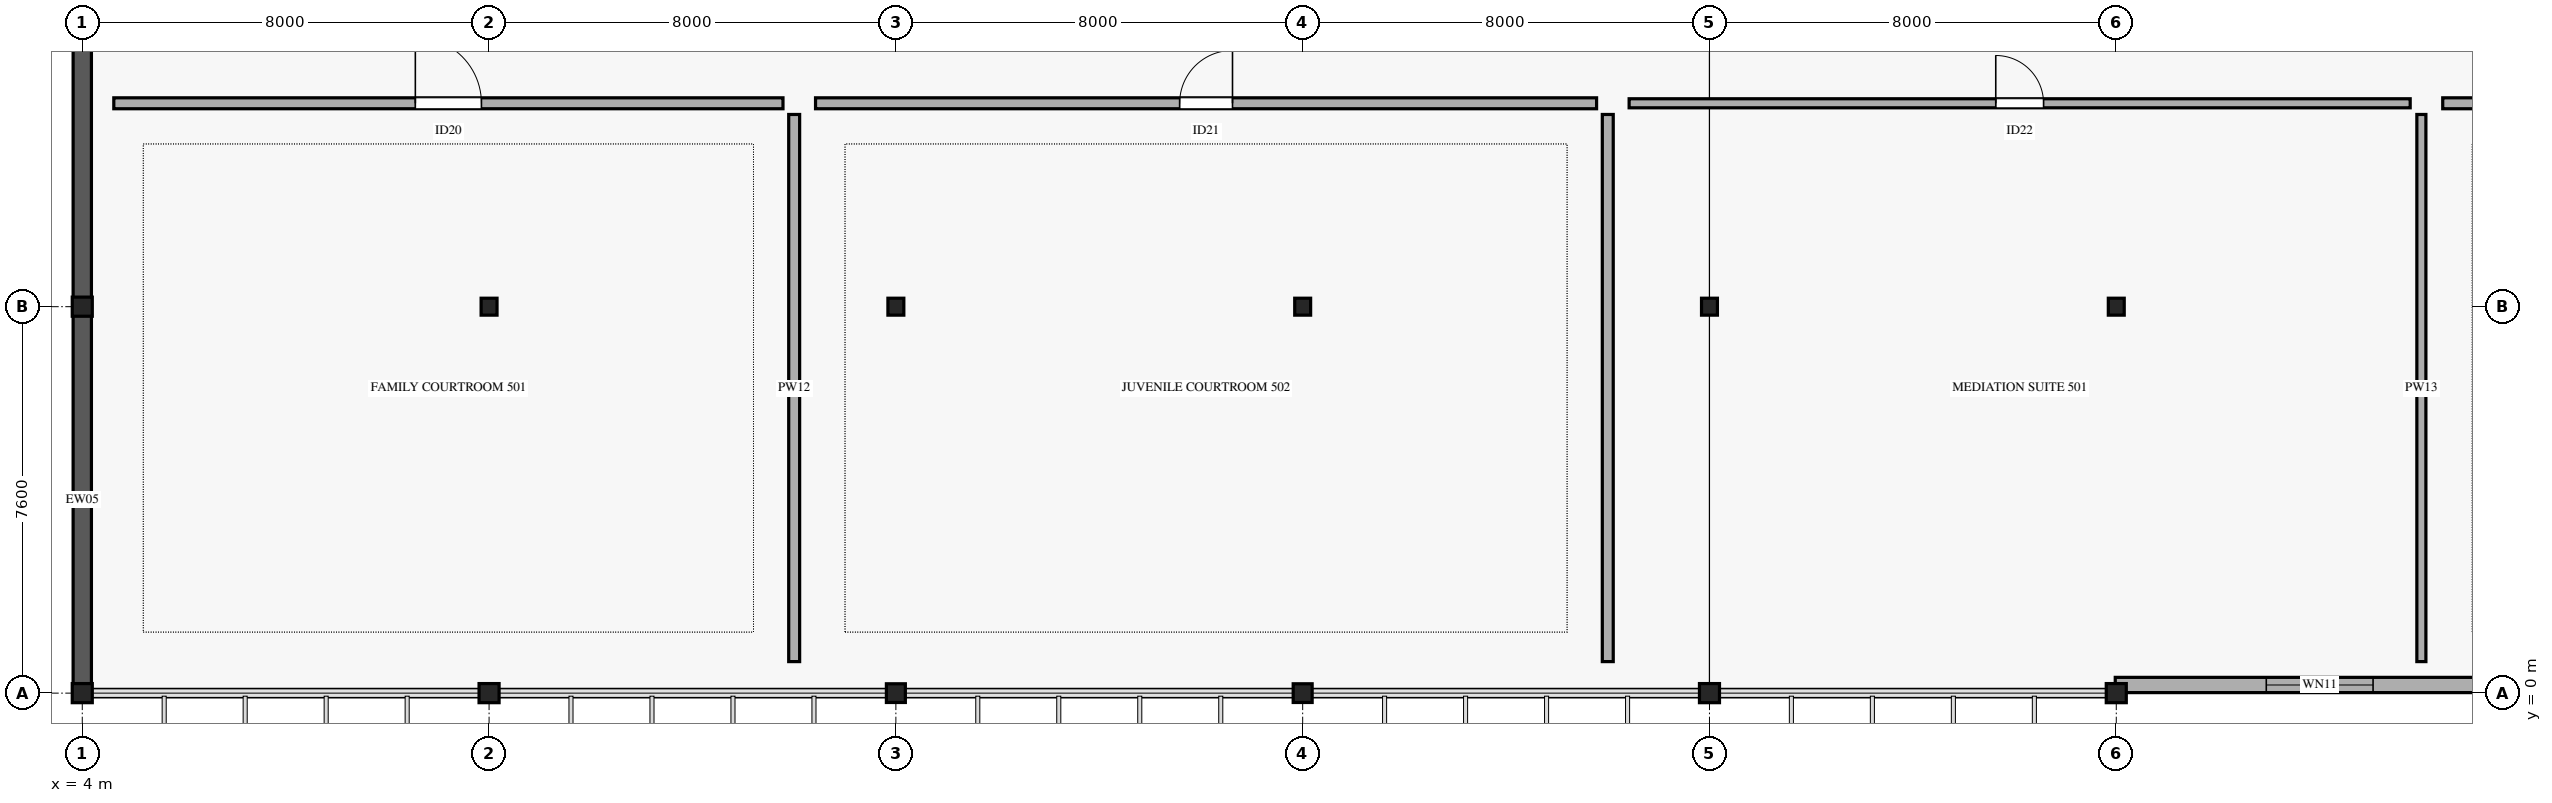
"""IFC4 building model, lengths in metres.
Left out: names, types, materials, properties, quantities, classifications, styles, units other than length and angle.
Written with IfcOpenShell. Run it as: python <this file> out.ifc"""

import sys

from ifc_helpers import new_model, si_unit, direction, frame, frame_2d, origin, origin_2d, place, context, subcontext, project, spatial, rectangle, i_section, extrude, element, fill, save


model = new_model("IFC4")
c1 = context("Model", 3, precision=1e-05, world=origin(), true_north=direction((0.0, 1.0)))
c2 = subcontext(c1, "Body", "Model", "MODEL_VIEW")
j1 = project(units=[si_unit("LENGTHUNIT", "METRE"), si_unit("PLANEANGLEUNIT", "RADIAN")], contexts=[c1])
p1 = place(None, origin())
s1 = spatial("IfcSite", under=j1, at=p1, CompositionType="ELEMENT")
p2 = place(p1, origin())
s2 = spatial("IfcBuilding", under=s1, at=p2, CompositionType="ELEMENT")
p3 = place(p2, frame((0.0, 0.0, 25.2)))
s3 = spatial("IfcBuildingStorey", under=s2, at=p3, CompositionType="ELEMENT", Elevation=25.2)
for number, where, z_axis, x_axis in (
    (1, (4.0, 0.0, 0.0), (0.0, 0.0, 1.0), (1.0, 0.0, 0.0)),
    (2, (4.0, 7.6, 0.0), (0.0, 0.0, 1.0), (1.0, 0.0, 0.0)),
    (3, (12.0, 0.0, 0.0), (0.0, 0.0, 1.0), (1.0, 0.0, 0.0)),
):
    element("IfcColumn", number, at=place(p3, frame(where, z_axis=z_axis, x_axis=x_axis)), inside=s3, PredefinedType="COLUMN", context=c2, shape_type="SweptSolid", body=[
        extrude(i_section(OverallWidth=0.394, OverallDepth=0.376, WebThickness=0.017, FlangeThickness=0.028, FilletRadius=0.015, at=origin_2d()), origin(), (0.0, 0.0, 1.0), 3.995),
    ])
p4 = place(p3, frame((12.0, 7.6, 0.0), z_axis=(0.0, 0.0, 1.0), x_axis=(1.0, 0.0, 0.0)))
e4 = element("IfcColumn", 4, at=p4, inside=s3, PredefinedType="COLUMN", context=c2, shape_type="SweptSolid", body=[
    extrude(i_section(OverallWidth=0.313, OverallDepth=0.333, WebThickness=0.018, FlangeThickness=0.028, FilletRadius=0.015, at=origin_2d()), origin(), (0.0, 0.0, 1.0), 3.995),
])
p5 = place(p3, frame((20.0, 0.0, 0.0), z_axis=(0.0, 0.0, 1.0), x_axis=(1.0, 0.0, 0.0)))
e5 = element("IfcColumn", 5, at=p5, inside=s3, PredefinedType="COLUMN", context=c2, shape_type="SweptSolid", body=[
    extrude(i_section(OverallWidth=0.373, OverallDepth=0.368, WebThickness=0.015, FlangeThickness=0.024, FilletRadius=0.015, at=origin_2d()), origin(), (0.0, 0.0, 1.0), 3.995),
])
p6 = place(p3, frame((20.0, 7.6, 0.0), z_axis=(0.0, 0.0, 1.0), x_axis=(1.0, 0.0, 0.0)))
e6 = element("IfcColumn", 6, at=p6, inside=s3, PredefinedType="COLUMN", context=c2, shape_type="SweptSolid", body=[
    extrude(i_section(OverallWidth=0.313, OverallDepth=0.333, WebThickness=0.018, FlangeThickness=0.028, FilletRadius=0.015, at=origin_2d()), origin(), (0.0, 0.0, 1.0), 3.995),
])
p7 = place(p3, frame((28.0, 0.0, 0.0), z_axis=(0.0, 0.0, 1.0), x_axis=(1.0, 0.0, 0.0)))
e7 = element("IfcColumn", 7, at=p7, inside=s3, PredefinedType="COLUMN", context=c2, shape_type="SweptSolid", body=[
    extrude(i_section(OverallWidth=0.373, OverallDepth=0.368, WebThickness=0.015, FlangeThickness=0.024, FilletRadius=0.015, at=origin_2d()), origin(), (0.0, 0.0, 1.0), 3.995),
])
p8 = place(p3, frame((28.0, 7.6, 0.0), z_axis=(0.0, 0.0, 1.0), x_axis=(1.0, 0.0, 0.0)))
e8 = element("IfcColumn", 8, at=p8, inside=s3, PredefinedType="COLUMN", context=c2, shape_type="SweptSolid", body=[
    extrude(i_section(OverallWidth=0.313, OverallDepth=0.333, WebThickness=0.018, FlangeThickness=0.028, FilletRadius=0.015, at=origin_2d()), origin(), (0.0, 0.0, 1.0), 3.995),
])
p9 = place(p3, frame((36.0, 0.0, 0.0), z_axis=(0.0, 0.0, 1.0), x_axis=(1.0, 0.0, 0.0)))
e9 = element("IfcColumn", 9, at=p9, inside=s3, PredefinedType="COLUMN", context=c2, shape_type="SweptSolid", body=[
    extrude(i_section(OverallWidth=0.394, OverallDepth=0.376, WebThickness=0.017, FlangeThickness=0.028, FilletRadius=0.015, at=origin_2d()), origin(), (0.0, 0.0, 1.0), 3.995),
])
p10 = place(p3, frame((36.0, 7.6, 0.0), z_axis=(0.0, 0.0, 1.0), x_axis=(1.0, 0.0, 0.0)))
e10 = element("IfcColumn", 10, at=p10, inside=s3, PredefinedType="COLUMN", context=c2, shape_type="SweptSolid", body=[
    extrude(i_section(OverallWidth=0.313, OverallDepth=0.333, WebThickness=0.018, FlangeThickness=0.028, FilletRadius=0.015, at=origin_2d()), origin(), (0.0, 0.0, 1.0), 3.995),
])
p11 = place(p3, frame((44.0, 0.0, 0.0), z_axis=(0.0, 0.0, 1.0), x_axis=(1.0, 0.0, 0.0)))
e11 = element("IfcColumn", 11, at=p11, inside=s3, PredefinedType="COLUMN", context=c2, shape_type="SweptSolid", body=[
    extrude(i_section(OverallWidth=0.394, OverallDepth=0.376, WebThickness=0.017, FlangeThickness=0.028, FilletRadius=0.015, at=origin_2d()), origin(), (0.0, 0.0, 1.0), 3.995),
])
p12 = place(p3, frame((44.0, 7.6, 0.0), z_axis=(0.0, 0.0, 1.0), x_axis=(1.0, 0.0, 0.0)))
e12 = element("IfcColumn", 12, at=p12, inside=s3, PredefinedType="COLUMN", context=c2, shape_type="SweptSolid", body=[
    extrude(i_section(OverallWidth=0.313, OverallDepth=0.333, WebThickness=0.018, FlangeThickness=0.028, FilletRadius=0.015, at=origin_2d()), origin(), (0.0, 0.0, 1.0), 3.995),
])
p13 = place(p3, frame((4.0, -0.02, 0.0), z_axis=(0.0, 0.0, 1.0), x_axis=(0.0, 1.0, 0.0)))
e13 = element("IfcWall", 13, at=p13, inside=s3, PredefinedType="STANDARD", context=c2, shape_type="SweptSolid", body=[
    extrude(rectangle(XDim=7.64, YDim=0.36, at=frame_2d((3.82, 0.0))), origin(), (0.0, 0.0, 1.0), 4.0),
])
p14 = place(p3, frame((4.0, 7.58, 0.0), z_axis=(0.0, 0.0, 1.0), x_axis=(0.0, 1.0, 0.0)))
e14 = element("IfcWall", 14, at=p14, inside=s3, PredefinedType="STANDARD", context=c2, shape_type="SweptSolid", body=[
    extrude(rectangle(XDim=7.64, YDim=0.36, at=frame_2d((3.82, 0.0))), origin(), (0.0, 0.0, 1.0), 4.0),
])
p15 = place(p3, frame((52.02, 0.16, 0.0), z_axis=(0.0, 0.0, 1.0), x_axis=(-1.0, 0.0, 0.0)))
e15 = element("IfcWall", 15, at=p15, inside=s3, PredefinedType="STANDARD", context=c2, shape_type="SweptSolid", body=[
    extrude(rectangle(XDim=8.04, YDim=0.3, at=frame_2d((4.02, 0.0))), origin(), (0.0, 0.0, 1.0), 3.06),
])
p16 = place(p15, frame((2.97, 0.0, 0.75)))
e16 = element("IfcOpeningElement", 16, at=p16, cuts=e15, PredefinedType="OPENING", context=c2, shape_type="SweptSolid", body=[
    extrude(rectangle(XDim=2.1, YDim=2.15, at=frame_2d((1.05, 1.075))), frame((0.0, 0.16, 0.0), z_axis=(0.0, -1.0, 0.0), x_axis=(1.0, 0.0, 0.0)), (0.0, 0.0, 1.0), 0.32),
])
p17 = place(p3, frame((4.62, 11.6, 0.0), z_axis=(0.0, 0.0, 1.0), x_axis=(1.0, 0.0, 0.0)))
e17 = element("IfcWall", 17, at=p17, inside=s3, PredefinedType="PARTITIONING", context=c2, shape_type="SweptSolid", body=[
    extrude(rectangle(XDim=13.16, YDim=0.215, at=frame_2d((6.58, 0.0))), origin(), (0.0, 0.0, 1.0), 2.85),
])
p18 = place(p17, frame((5.93, 0.0, 0.0)))
e18 = element("IfcOpeningElement", 18, at=p18, cuts=e17, PredefinedType="OPENING", context=c2, shape_type="SweptSolid", body=[
    extrude(rectangle(XDim=1.3, YDim=2.2, at=frame_2d((0.65, 1.1))), frame((0.0, 0.117, 0.0), z_axis=(0.0, -1.0, 0.0), x_axis=(1.0, 0.0, 0.0)), (0.0, 0.0, 1.0), 0.235),
])
p19 = place(p3, frame((18.0, 0.62, 0.0), z_axis=(0.0, 0.0, 1.0), x_axis=(0.0, 1.0, 0.0)))
e19 = element("IfcWall", 19, at=p19, inside=s3, PredefinedType="PARTITIONING", context=c2, shape_type="SweptSolid", body=[
    extrude(rectangle(XDim=10.76, YDim=0.215, at=frame_2d((5.38, 0.0))), origin(), (0.0, 0.0, 1.0), 2.85),
])
p20 = place(p3, frame((18.42, 11.6, 0.0), z_axis=(0.0, 0.0, 1.0), x_axis=(1.0, 0.0, 0.0)))
e20 = element("IfcWall", 20, at=p20, inside=s3, PredefinedType="PARTITIONING", context=c2, shape_type="SweptSolid", body=[
    extrude(rectangle(XDim=15.36, YDim=0.215, at=frame_2d((7.68, 0.0))), origin(), (0.0, 0.0, 1.0), 2.85),
])
p21 = place(p20, frame((7.16, 0.0, 0.0)))
e21 = element("IfcOpeningElement", 21, at=p21, cuts=e20, PredefinedType="OPENING", context=c2, shape_type="SweptSolid", body=[
    extrude(rectangle(XDim=1.04, YDim=2.2, at=frame_2d((0.52, 1.1))), frame((0.0, 0.117, 0.0), z_axis=(0.0, -1.0, 0.0), x_axis=(1.0, 0.0, 0.0)), (0.0, 0.0, 1.0), 0.235),
])
p22 = place(p3, frame((34.0, 0.62, 0.0), z_axis=(0.0, 0.0, 1.0), x_axis=(0.0, 1.0, 0.0)))
e22 = element("IfcWall", 22, at=p22, inside=s3, PredefinedType="PARTITIONING", context=c2, shape_type="SweptSolid", body=[
    extrude(rectangle(XDim=10.76, YDim=0.215, at=frame_2d((5.38, 0.0))), origin(), (0.0, 0.0, 1.0), 2.85),
])
p23 = place(p3, frame((34.42, 11.6, 0.0), z_axis=(0.0, 0.0, 1.0), x_axis=(1.0, 0.0, 0.0)))
e23 = element("IfcWall", 23, at=p23, inside=s3, PredefinedType="PARTITIONING", context=c2, shape_type="SweptSolid", body=[
    extrude(rectangle(XDim=15.36, YDim=0.178, at=frame_2d((7.68, 0.0))), origin(), (0.0, 0.0, 1.0), 2.85),
])
p24 = place(p23, frame((7.21, 0.0, 0.0)))
e24 = element("IfcOpeningElement", 24, at=p24, cuts=e23, PredefinedType="OPENING", context=c2, shape_type="SweptSolid", body=[
    extrude(rectangle(XDim=0.94, YDim=2.2, at=frame_2d((0.47, 1.1))), frame((0.0, 0.099, 0.0), z_axis=(0.0, -1.0, 0.0), x_axis=(1.0, 0.0, 0.0)), (0.0, 0.0, 1.0), 0.198),
])
p25 = place(p3, frame((50.0, 0.62, 0.0), z_axis=(0.0, 0.0, 1.0), x_axis=(0.0, 1.0, 0.0)))
e25 = element("IfcWall", 25, at=p25, inside=s3, PredefinedType="PARTITIONING", context=c2, shape_type="SweptSolid", body=[
    extrude(rectangle(XDim=10.76, YDim=0.178, at=frame_2d((5.38, 0.0))), origin(), (0.0, 0.0, 1.0), 2.85),
])
p26 = place(p3, frame((50.42, 11.6, 0.0), z_axis=(0.0, 0.0, 1.0), x_axis=(1.0, 0.0, 0.0)))
e26 = element("IfcWall", 26, at=p26, inside=s3, PredefinedType="PARTITIONING", context=c2, shape_type="SweptSolid", body=[
    extrude(rectangle(XDim=15.36, YDim=0.215, at=frame_2d((7.68, 0.0))), origin(), (0.0, 0.0, 1.0), 2.85),
])
p27 = place(p26, frame((7.205, 0.0, 0.0)))
e27 = element("IfcOpeningElement", 27, at=p27, cuts=e26, PredefinedType="OPENING", context=c2, shape_type="SweptSolid", body=[
    extrude(rectangle(XDim=0.95, YDim=2.15, at=frame_2d((0.475, 1.075))), frame((0.0, 0.117, 0.0), z_axis=(0.0, -1.0, 0.0), x_axis=(1.0, 0.0, 0.0)), (0.0, 0.0, 1.0), 0.235),
])
p28 = place(p16, origin())
e28 = element("IfcWindow", 28, at=p28, inside=s3, PartitioningType="SINGLE_PANEL", PredefinedType="WINDOW", context=c2, shape_type="SweptSolid", body=[
    extrude(rectangle(XDim=2.1, YDim=2.15, at=frame_2d((1.05, 1.075))), frame((0.0, 0.03, 0.0), z_axis=(0.0, -1.0, 0.0), x_axis=(1.0, 0.0, 0.0)), (0.0, 0.0, 1.0), 0.06),
])
fill(e16, e28)
p29 = place(p18, origin())
e29 = element("IfcDoor", 29, at=p29, inside=s3, OperationType="SINGLE_SWING_LEFT", PredefinedType="DOOR", context=c2, shape_type="SweptSolid", body=[
    extrude(rectangle(XDim=1.3, YDim=2.2, at=frame_2d((0.65, 1.1))), frame((0.0, 0.025, 0.0), z_axis=(0.0, -1.0, 0.0), x_axis=(1.0, 0.0, 0.0)), (0.0, 0.0, 1.0), 0.05),
])
fill(e18, e29)
p30 = place(p21, origin())
e30 = element("IfcDoor", 30, at=p30, inside=s3, OperationType="SINGLE_SWING_RIGHT", PredefinedType="DOOR", context=c2, shape_type="SweptSolid", body=[
    extrude(rectangle(XDim=1.04, YDim=2.2, at=frame_2d((0.52, 1.1))), frame((0.0, 0.025, 0.0), z_axis=(0.0, -1.0, 0.0), x_axis=(1.0, 0.0, 0.0)), (0.0, 0.0, 1.0), 0.05),
])
fill(e21, e30)
p31 = place(p24, origin())
e31 = element("IfcDoor", 31, at=p31, inside=s3, OperationType="SINGLE_SWING_LEFT", PredefinedType="DOOR", context=c2, shape_type="SweptSolid", body=[
    extrude(rectangle(XDim=0.94, YDim=2.2, at=frame_2d((0.47, 1.1))), frame((0.0, 0.025, 0.0), z_axis=(0.0, -1.0, 0.0), x_axis=(1.0, 0.0, 0.0)), (0.0, 0.0, 1.0), 0.05),
])
fill(e24, e31)
save(model, sys.argv[1])
